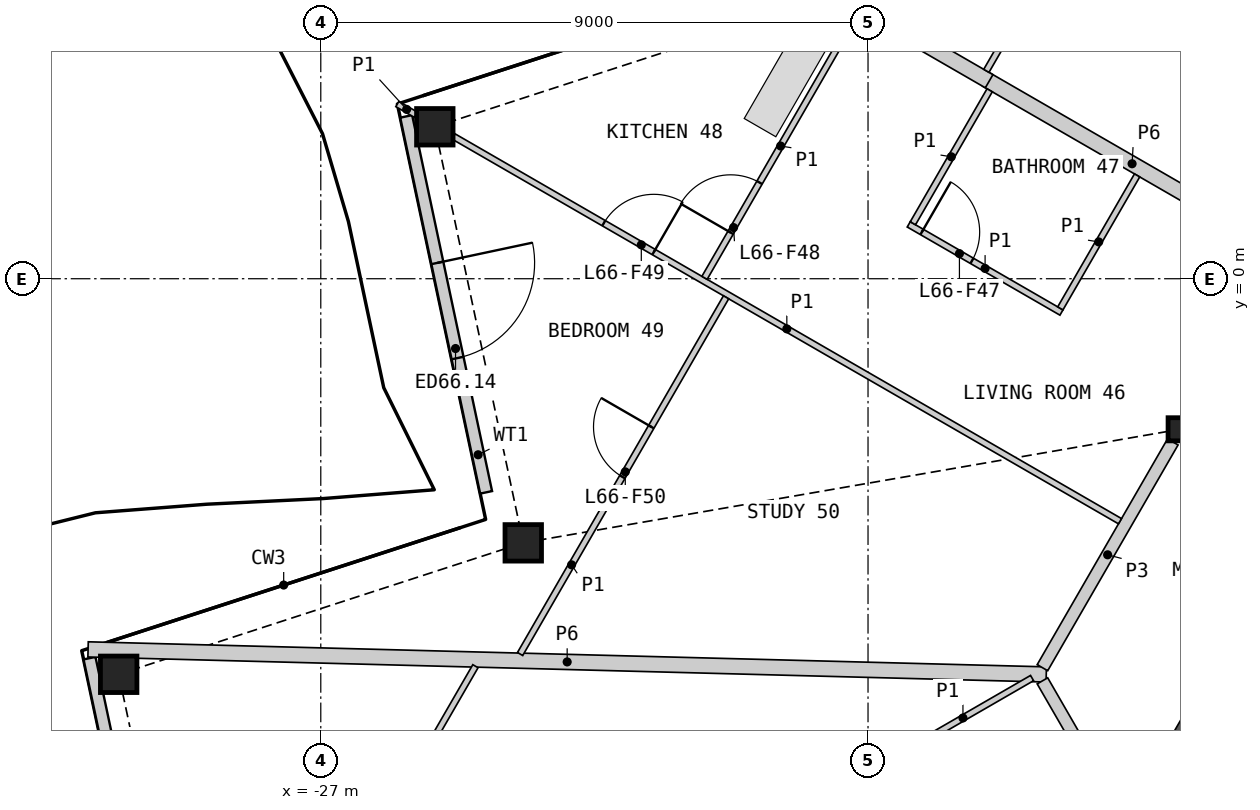
"""IFC4 building model, lengths in metres.
Left out: names, types, materials, properties, quantities, classifications, styles, units other than length and angle.
Written with IfcOpenShell. Run it as: python <this file> out.ifc"""

import sys

from ifc_helpers import new_model, si_unit, direction, frame, frame_2d, origin, origin_2d, place, context, subcontext, project, spatial, polyline, rectangle, hollow_rectangle, i_section, outline, extrude, element, fill, save


model = new_model("IFC4")
c1 = context("Model", 3, precision=1e-05, world=origin(), true_north=direction((0.0, 1.0)))
c2 = subcontext(c1, "Body", "Model", "MODEL_VIEW")
j1 = project(units=[si_unit("LENGTHUNIT", "METRE"), si_unit("PLANEANGLEUNIT", "RADIAN")], contexts=[c1])
p1 = place(None, origin())
s1 = spatial("IfcSite", under=j1, at=p1, CompositionType="ELEMENT")
p2 = place(p1, origin())
s2 = spatial("IfcBuilding", under=s1, at=p2, CompositionType="ELEMENT")
p3 = place(p2, frame((0.0, 0.0, 305.2)))
s3 = spatial("IfcBuildingStorey", under=s2, at=p3, CompositionType="ELEMENT", Elevation=305.2)
for number, where, z_axis, x_axis in (
    (1, (-25.125, 2.499, 0.0), (0.0, 0.0, 1.0), (1.0, 0.0, 0.0)),
    (2, (-23.67, -4.344, 0.0), (0.0, 0.0, 1.0), (1.0, 0.0, 0.0)),
    (3, (-30.324, -6.506, 0.0), (0.0, 0.0, 1.0), (1.0, 0.0, 0.0)),
):
    element("IfcColumn", number, at=place(p3, frame(where, z_axis=z_axis, x_axis=x_axis)), inside=s3, PredefinedType="COLUMN", context=c2, shape_type="SweptSolid", body=[
        extrude(hollow_rectangle(XDim=0.6, YDim=0.6, WallThickness=0.04, at=origin_2d()), origin(), (0.0, 0.0, 1.0), 3.4),
    ])
p4 = place(p3, frame((-12.868, -2.476, 0.0), z_axis=(0.0, 0.0, 1.0), x_axis=(1.0, 0.0, 0.0)))
e4 = element("IfcColumn", 4, at=p4, inside=s3, PredefinedType="COLUMN", context=c2, shape_type="SweptSolid", body=[
    extrude(i_section(OverallWidth=0.396, OverallDepth=0.381, WebThickness=0.019, FlangeThickness=0.03, at=origin_2d()), origin(), (0.0, 0.0, 1.0), 3.4),
])
p5 = place(p3, frame((-25.595, 2.67, 0.0), z_axis=(0.0, 0.0, 1.0), x_axis=(0.207888316408, -0.978152568826, 0.0)))
e5 = element("IfcWall", 5, at=p5, inside=s3, PredefinedType="SOLIDWALL", context=c2, shape_type="SweptSolid", body=[
    extrude(rectangle(XDim=6.322, YDim=0.2, at=frame_2d((3.161, 0.0))), origin(), (0.0, 0.0, 1.0), 2.488),
])
p6 = place(p5, frame((2.463, 0.0, 0.0)))
e6 = element("IfcOpeningElement", 6, at=p6, cuts=e5, PredefinedType="OPENING", context=c2, shape_type="SweptSolid", body=[
    extrude(rectangle(XDim=1.6, YDim=2.25, at=frame_2d((0.8, 1.125))), frame((0.0, 0.11, 0.0), z_axis=(0.0, -1.0, 0.0), x_axis=(1.0, 0.0, 0.0)), (0.0, 0.0, 1.0), 0.22),
])
p7 = place(p3, frame((-30.803, -6.241, 0.0), z_axis=(0.0, 0.0, 1.0), x_axis=(0.207917941651, -0.978146272057, 0.0)))
e7 = element("IfcWall", 7, at=p7, inside=s3, PredefinedType="SOLIDWALL", context=c2, shape_type="SweptSolid", body=[
    extrude(rectangle(XDim=6.759, YDim=0.2, at=frame_2d((3.379, 0.0))), origin(), (0.0, 0.0, 1.0), 2.488),
])
p8 = place(p7, frame((2.545, 0.0, 0.0)))
e8 = element("IfcOpeningElement", 8, at=p8, cuts=e7, PredefinedType="OPENING", context=c2, shape_type="SweptSolid", body=[
    extrude(rectangle(XDim=1.6, YDim=2.25, at=frame_2d((0.8, 1.125))), frame((0.0, 0.11, 0.0), z_axis=(0.0, -1.0, 0.0), x_axis=(1.0, 0.0, 0.0)), (0.0, 0.0, 1.0), 0.22),
])
p9 = place(p3, origin())
e9 = element("IfcWall", 9, at=p9, inside=s3, PredefinedType="SHEAR", context=c2, shape_type="SweptSolid", body=[
    extrude(outline(polyline([(-12.48, -6.606), (-11.961, -6.906), (-11.961, -7.506), (-13.0, -7.506), (-12.48, -6.606)])), origin(), (0.0, 0.0, 1.0), 3.1),
])
p10 = place(p3, frame((-30.827, -6.096, 0.0), z_axis=(0.0, 0.0, 1.0), x_axis=(0.999657799118, -0.026158835273, 0.0)))
e10 = element("IfcWall", 10, at=p10, inside=s3, PredefinedType="PARTITIONING", context=c2, shape_type="SweptSolid", body=[
    extrude(rectangle(XDim=15.763, YDim=0.25, at=frame_2d((7.882, 0.0))), origin(), (0.0, 0.0, 1.0), 2.33),
])
p11 = place(p3, frame((-16.054, 3.275, 0.0), z_axis=(0.0, 0.0, 1.0), x_axis=(0.866019581949, -0.500010083578, 0.0)))
e11 = element("IfcWall", 11, at=p11, inside=s3, PredefinedType="PARTITIONING", context=c2, shape_type="SweptSolid", body=[
    extrude(rectangle(XDim=5.535, YDim=0.25, at=frame_2d((2.768, 0.0))), origin(), (0.0, 0.0, 1.0), 2.33),
])
p12 = place(p3, frame((-15.131, -6.397, 0.0), z_axis=(0.0, 0.0, 1.0), x_axis=(0.500003406062, 0.866023437285, 0.0)))
e12 = element("IfcWall", 12, at=p12, inside=s3, PredefinedType="PARTITIONING", context=c2, shape_type="SweptSolid", body=[
    extrude(rectangle(XDim=4.288, YDim=0.2, at=frame_2d((2.144, 0.0))), origin(), (0.0, 0.0, 1.0), 3.1),
])
p13 = place(p3, frame((-15.131, -6.614, 0.0), z_axis=(0.0, 0.0, 1.0), x_axis=(0.499967746641, -0.866044024469, 0.0)))
e13 = element("IfcWall", 13, at=p13, inside=s3, PredefinedType="PARTITIONING", context=c2, shape_type="SweptSolid", body=[
    extrude(rectangle(XDim=3.676, YDim=0.2, at=frame_2d((1.838, 0.0))), origin(), (0.0, 0.0, 1.0), 3.1),
])
p14 = place(p13, frame((2.426, 0.0, 0.0)))
e14 = element("IfcOpeningElement", 14, at=p14, cuts=e13, PredefinedType="OPENING", context=c2, shape_type="SweptSolid", body=[
    extrude(rectangle(XDim=1.0, YDim=2.1, at=frame_2d((0.5, 1.05))), frame((0.0, 0.11, 0.0), z_axis=(0.0, -1.0, 0.0), x_axis=(1.0, 0.0, 0.0)), (0.0, 0.0, 1.0), 0.22),
])
p15 = place(p3, frame((-18.127, 4.472, 0.0), z_axis=(0.0, 0.0, 1.0), x_axis=(0.866017755388, -0.500013247177, 0.0)))
e15 = element("IfcWall", 15, at=p15, inside=s3, PredefinedType="PARTITIONING", context=c2, shape_type="SweptSolid", body=[
    extrude(rectangle(XDim=2.447, YDim=0.25, at=frame_2d((1.223, 0.0))), origin(), (0.0, 0.0, 1.0), 2.33),
])
p16 = place(p3, frame((-16.054, 3.419, 0.0), z_axis=(0.0, 0.0, 1.0), x_axis=(0.499999256795, 0.866025832873, 0.0)))
e16 = element("IfcWall", 16, at=p16, inside=s3, PredefinedType="PARTITIONING", context=c2, shape_type="SweptSolid", body=[
    extrude(rectangle(XDim=15.448, YDim=0.1, at=frame_2d((7.724, 0.0))), origin(), (0.0, 0.0, 1.0), 2.33),
])
p17 = place(p16, frame((8.306, 0.0, 0.0)))
e17 = element("IfcOpeningElement", 17, at=p17, cuts=e16, PredefinedType="OPENING", context=c2, shape_type="SweptSolid", body=[
    extrude(rectangle(XDim=0.95, YDim=2.1, at=frame_2d((0.475, 1.05))), frame((0.0, 0.06, 0.0), z_axis=(0.0, -1.0, 0.0), x_axis=(1.0, 0.0, 0.0)), (0.0, 0.0, 1.0), 0.12),
])
p18 = place(p16, frame((1.76, 0.0, 0.0)))
e18 = element("IfcOpeningElement", 18, at=p18, cuts=e16, PredefinedType="OPENING", context=c2, shape_type="SweptSolid", body=[
    extrude(rectangle(XDim=0.95, YDim=2.1, at=frame_2d((0.475, 1.05))), frame((0.0, 0.06, 0.0), z_axis=(0.0, -1.0, 0.0), x_axis=(1.0, 0.0, 0.0)), (0.0, 0.0, 1.0), 0.12),
])
p19 = place(p3, frame((-24.815, 2.339, 0.0), z_axis=(0.0, 0.0, 1.0), x_axis=(0.866021406514, -0.500006923412, 0.0)))
e19 = element("IfcWall", 19, at=p19, inside=s3, PredefinedType="PARTITIONING", context=c2, shape_type="SweptSolid", body=[
    extrude(rectangle(XDim=12.654, YDim=0.1, at=frame_2d((6.327, 0.0))), origin(), (0.0, 0.0, 1.0), 2.33),
])
p20 = place(p19, frame((2.851, 0.0, 0.0)))
e20 = element("IfcOpeningElement", 20, at=p20, cuts=e19, PredefinedType="OPENING", context=c2, shape_type="SweptSolid", body=[
    extrude(rectangle(XDim=0.95, YDim=2.1, at=frame_2d((0.475, 1.05))), frame((0.0, 0.06, 0.0), z_axis=(0.0, -1.0, 0.0), x_axis=(1.0, 0.0, 0.0)), (0.0, 0.0, 1.0), 0.12),
])
p21 = place(p3, frame((-23.722, -6.172, 0.0), z_axis=(0.0, 0.0, 1.0), x_axis=(0.499991774685, 0.86603015262, 0.0)))
e21 = element("IfcWall", 21, at=p21, inside=s3, PredefinedType="PARTITIONING", context=c2, shape_type="SweptSolid", body=[
    extrude(rectangle(XDim=6.774, YDim=0.1, at=frame_2d((3.387, 0.0))), origin(), (0.0, 0.0, 1.0), 2.33),
])
p22 = place(p21, frame((3.364, 0.0, 0.0)))
e22 = element("IfcOpeningElement", 22, at=p22, cuts=e21, PredefinedType="OPENING", context=c2, shape_type="SweptSolid", body=[
    extrude(rectangle(XDim=0.95, YDim=2.1, at=frame_2d((0.475, 1.05))), frame((0.0, 0.06, 0.0), z_axis=(0.0, -1.0, 0.0), x_axis=(1.0, 0.0, 0.0)), (0.0, 0.0, 1.0), 0.12),
])
p23 = place(p3, frame((-20.689, 0.014, 0.0), z_axis=(0.0, 0.0, 1.0), x_axis=(0.500003822013, 0.866023197133, 0.0)))
e23 = element("IfcWall", 23, at=p23, inside=s3, PredefinedType="PARTITIONING", context=c2, shape_type="SweptSolid", body=[
    extrude(rectangle(XDim=5.007, YDim=0.1, at=frame_2d((2.504, 0.0))), origin(), (0.0, 0.0, 1.0), 2.33),
])
p24 = place(p23, frame((0.86, 0.0, 0.0)))
e24 = element("IfcOpeningElement", 24, at=p24, cuts=e23, PredefinedType="OPENING", context=c2, shape_type="SweptSolid", body=[
    extrude(rectangle(XDim=0.95, YDim=2.1, at=frame_2d((0.475, 1.05))), frame((0.0, 0.06, 0.0), z_axis=(0.0, -1.0, 0.0), x_axis=(1.0, 0.0, 0.0)), (0.0, 0.0, 1.0), 0.12),
])
p25 = place(p3, frame((-26.788, -10.41, 0.0), z_axis=(0.0, 0.0, 1.0), x_axis=(0.499997484116, 0.866026856326, 0.0)))
e25 = element("IfcWall", 25, at=p25, inside=s3, PredefinedType="PARTITIONING", context=c2, shape_type="SweptSolid", body=[
    extrude(rectangle(XDim=4.662, YDim=0.1, at=frame_2d((2.331, 0.0))), origin(), (0.0, 0.0, 1.0), 2.33),
])
p26 = place(p25, frame((0.752, 0.0, 0.0)))
e26 = element("IfcOpeningElement", 26, at=p26, cuts=e25, PredefinedType="OPENING", context=c2, shape_type="SweptSolid", body=[
    extrude(rectangle(XDim=0.95, YDim=2.1, at=frame_2d((0.475, 1.05))), frame((0.0, 0.06, 0.0), z_axis=(0.0, -1.0, 0.0), x_axis=(1.0, 0.0, 0.0)), (0.0, 0.0, 1.0), 0.12),
])
p27 = place(p3, frame((-17.33, 0.894, 0.0), z_axis=(0.0, 0.0, 1.0), x_axis=(0.866032775405, -0.499987231761, 0.0)))
e27 = element("IfcWall", 27, at=p27, inside=s3, PredefinedType="PARTITIONING", context=c2, shape_type="SweptSolid", body=[
    extrude(rectangle(XDim=2.9, YDim=0.1, at=frame_2d((1.45, 0.0))), origin(), (0.0, 0.0, 1.0), 2.33),
])
p28 = place(p27, frame((0.25, 0.0, 0.0)))
e28 = element("IfcOpeningElement", 28, at=p28, cuts=e27, PredefinedType="OPENING", context=c2, shape_type="SweptSolid", body=[
    extrude(rectangle(XDim=0.95, YDim=2.1, at=frame_2d((0.475, 1.05))), frame((0.0, 0.06, 0.0), z_axis=(0.0, -1.0, 0.0), x_axis=(1.0, 0.0, 0.0)), (0.0, 0.0, 1.0), 0.12),
])
p29 = place(p3, frame((-14.837, -0.488, 0.0), z_axis=(0.0, 0.0, 1.0), x_axis=(0.499976333282, 0.866039067339, 0.0)))
e29 = element("IfcWall", 29, at=p29, inside=s3, PredefinedType="PARTITIONING", context=c2, shape_type="SweptSolid", body=[
    extrude(rectangle(XDim=2.525, YDim=0.1, at=frame_2d((1.262, 0.0))), origin(), (0.0, 0.0, 1.0), 2.33),
])
p30 = place(p3, frame((-17.262, 0.912, 0.0), z_axis=(0.0, 0.0, 1.0), x_axis=(0.500048846702, 0.865997200291, 0.0)))
e30 = element("IfcWall", 30, at=p30, inside=s3, PredefinedType="PARTITIONING", context=c2, shape_type="SweptSolid", body=[
    extrude(rectangle(XDim=2.525, YDim=0.1, at=frame_2d((1.263, 0.0))), origin(), (0.0, 0.0, 1.0), 2.33),
])
p31 = place(p3, frame((-17.575, -7.881, 0.0), z_axis=(0.0, 0.0, 1.0), x_axis=(0.866013657776, 0.500020344131, 0.0)))
e31 = element("IfcWall", 31, at=p31, inside=s3, PredefinedType="PARTITIONING", context=c2, shape_type="SweptSolid", body=[
    extrude(rectangle(XDim=2.625, YDim=0.1, at=frame_2d((1.312, 0.0))), origin(), (0.0, 0.0, 1.0), 2.33),
])
p32 = place(p3, frame((-25.741, 2.874, 0.0), z_axis=(0.0, 0.0, 1.0), x_axis=(0.865851769275, -0.500300623268, 0.0)))
e32 = element("IfcWall", 32, at=p32, inside=s3, PredefinedType="PARTITIONING", context=c2, shape_type="SweptSolid", body=[
    extrude(rectangle(XDim=0.353, YDim=0.1, at=frame_2d((0.177, 0.0))), origin(), (0.0, 0.0, 1.0), 2.33),
])
p33 = place(p6, origin())
e33 = element("IfcDoor", 33, at=p33, inside=s3, OperationType="DOUBLE_DOOR_SINGLE_SWING", PredefinedType="DOOR", context=c2, shape_type="SweptSolid", body=[
    extrude(rectangle(XDim=1.6, YDim=2.25, at=frame_2d((0.8, 1.125))), frame((0.0, 0.025, 0.0), z_axis=(0.0, -1.0, 0.0), x_axis=(1.0, 0.0, 0.0)), (0.0, 0.0, 1.0), 0.05),
])
fill(e6, e33)
p34 = place(p28, origin())
e34 = element("IfcDoor", 34, at=p34, inside=s3, OperationType="SINGLE_SWING_LEFT", PredefinedType="DOOR", context=c2, shape_type="SweptSolid", body=[
    extrude(rectangle(XDim=0.95, YDim=2.1, at=frame_2d((0.475, 1.05))), frame((0.0, 0.025, 0.0), z_axis=(0.0, -1.0, 0.0), x_axis=(1.0, 0.0, 0.0)), (0.0, 0.0, 1.0), 0.05),
])
fill(e28, e34)
p35 = place(p24, origin())
e35 = element("IfcDoor", 35, at=p35, inside=s3, OperationType="SINGLE_SWING_LEFT", PredefinedType="DOOR", context=c2, shape_type="SweptSolid", body=[
    extrude(rectangle(XDim=0.95, YDim=2.1, at=frame_2d((0.475, 1.05))), frame((0.0, 0.025, 0.0), z_axis=(0.0, -1.0, 0.0), x_axis=(1.0, 0.0, 0.0)), (0.0, 0.0, 1.0), 0.05),
])
fill(e24, e35)
p36 = place(p20, origin())
e36 = element("IfcDoor", 36, at=p36, inside=s3, OperationType="SINGLE_SWING_RIGHT", PredefinedType="DOOR", context=c2, shape_type="SweptSolid", body=[
    extrude(rectangle(XDim=0.95, YDim=2.1, at=frame_2d((0.475, 1.05))), frame((0.0, 0.025, 0.0), z_axis=(0.0, -1.0, 0.0), x_axis=(1.0, 0.0, 0.0)), (0.0, 0.0, 1.0), 0.05),
])
fill(e20, e36)
p37 = place(p22, origin())
e37 = element("IfcDoor", 37, at=p37, inside=s3, OperationType="SINGLE_SWING_RIGHT", PredefinedType="DOOR", context=c2, shape_type="SweptSolid", body=[
    extrude(rectangle(XDim=0.95, YDim=2.1, at=frame_2d((0.475, 1.05))), frame((0.0, 0.025, 0.0), z_axis=(0.0, -1.0, 0.0), x_axis=(1.0, 0.0, 0.0)), (0.0, 0.0, 1.0), 0.05),
])
fill(e22, e37)
save(model, sys.argv[1])
